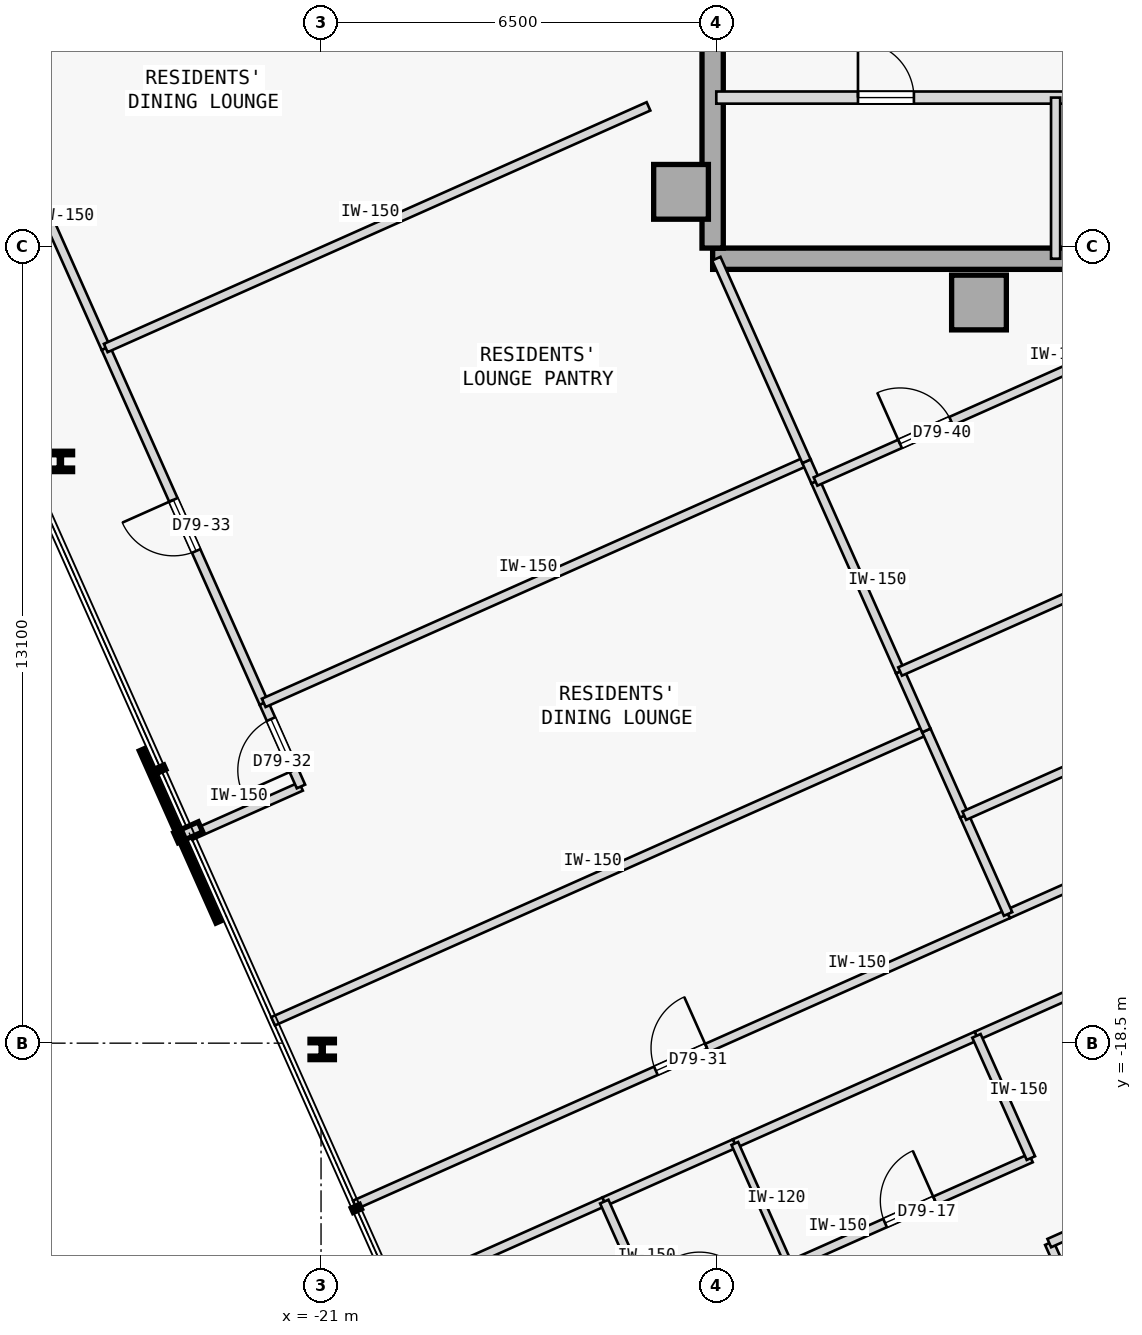
"""IFC4 building model, lengths in metres.
Left out: names, types, materials, properties, quantities, classifications, styles, units other than length and angle.
Written with IfcOpenShell. Run it as: python <this file> out.ifc"""

import sys

from ifc_helpers import new_model, si_unit, direction, frame, frame_2d, origin, origin_2d, place, context, subcontext, project, spatial, rectangle, i_section, extrude, element, fill, save


model = new_model("IFC4")
c1 = context("Model", 3, precision=1e-05, world=origin(), true_north=direction((0.0, 1.0)))
c2 = subcontext(c1, "Body", "Model", "MODEL_VIEW")
j1 = project(units=[si_unit("LENGTHUNIT", "METRE"), si_unit("PLANEANGLEUNIT", "RADIAN")], contexts=[c1])
p1 = place(None, origin())
s1 = spatial("IfcSite", under=j1, at=p1, CompositionType="ELEMENT")
p2 = place(p1, origin())
s2 = spatial("IfcBuilding", under=s1, at=p2, CompositionType="ELEMENT")
p3 = place(p2, frame((0.0, 0.0, 295.3)))
s3 = spatial("IfcBuildingStorey", under=s2, at=p3, CompositionType="ELEMENT", Elevation=295.3)
for number, where, z_axis, x_axis in (
    (1, (-15.08, -4.5, 0.0), (0.0, 0.0, 1.0), (1.0, 0.0, 0.0)),
    (2, (-10.18, -6.32, 0.0), (0.0, 0.0, 1.0), (1.0, 0.0, 0.0)),
):
    element("IfcColumn", number, at=place(p3, frame(where, z_axis=z_axis, x_axis=x_axis)), inside=s3, PredefinedType="COLUMN", context=c2, shape_type="SweptSolid", body=[
        extrude(rectangle(XDim=0.9, YDim=0.9, at=origin_2d()), origin(), (0.0, 0.0, 1.0), 3.35),
    ])
p4 = place(p3, frame((-14.56, -5.6, 0.0), z_axis=(0.0, 0.0, 1.0), x_axis=(1.0, 0.0, 0.0)))
e3 = element("IfcWall", 3, at=p4, inside=s3, PredefinedType="SHEAR", context=c2, shape_type="SweptSolid", body=[
    extrude(rectangle(XDim=10.86, YDim=0.35, at=frame_2d((5.43, 0.0))), origin(), (0.0, 0.0, 1.0), 3.125),
])
p5 = place(p3, frame((-14.56, -5.425, 0.0), z_axis=(0.0, 0.0, 1.0), x_axis=(0.0, 1.0, 0.0)))
e4 = element("IfcWall", 4, at=p5, inside=s3, PredefinedType="SHEAR", context=c2, shape_type="SweptSolid", body=[
    extrude(rectangle(XDim=10.85, YDim=0.35, at=frame_2d((5.425, 0.0))), origin(), (0.0, 0.0, 1.0), 3.125),
])
for number, where, z_axis, x_axis in (
    (5, (-25.286, -8.933, 0.0), (0.0, 0.0, 1.0), (1.0, 0.0, 0.0)),
    (6, (-20.981, -18.603, 0.0), (0.0, 0.0, 1.0), (1.0, 0.0, 0.0)),
):
    element("IfcColumn", number, at=place(p3, frame(where, z_axis=z_axis, x_axis=x_axis)), inside=s3, PredefinedType="COLUMN", context=c2, shape_type="SweptSolid", body=[
        extrude(i_section(OverallWidth=0.401, OverallDepth=0.335, WebThickness=0.036, FlangeThickness=0.058, FilletRadius=0.015, at=origin_2d()), origin(), (0.0, 0.0, 1.0), 3.35),
    ])
p6 = place(p3, frame((-14.5, -2.95, 0.0), z_axis=(0.0, 0.0, 1.0), x_axis=(1.0, 0.0, 0.0)))
e7 = element("IfcWall", 7, at=p6, inside=s3, PredefinedType="STANDARD", context=c2, shape_type="SweptSolid", body=[
    extrude(rectangle(XDim=10.8, YDim=0.2, at=frame_2d((5.4, 0.0))), origin(), (0.0, 0.0, 1.0), 3.125),
])
p7 = place(p6, frame((9.17, 0.0, 0.0)))
e8 = element("IfcOpeningElement", 8, at=p7, cuts=e7, PredefinedType="OPENING", context=c2, shape_type="SweptSolid", body=[
    extrude(rectangle(XDim=1.1, YDim=2.15, at=frame_2d((0.55, 1.075))), frame((0.0, 0.11, 0.0), z_axis=(0.0, -1.0, 0.0), x_axis=(1.0, 0.0, 0.0)), (0.0, 0.0, 1.0), 0.22),
])
p8 = place(p6, frame((2.33, 0.0, 0.0)))
e9 = element("IfcOpeningElement", 9, at=p8, cuts=e7, PredefinedType="OPENING", context=c2, shape_type="SweptSolid", body=[
    extrude(rectangle(XDim=0.92, YDim=2.15, at=frame_2d((0.46, 1.075))), frame((0.0, 0.11, 0.0), z_axis=(0.0, -1.0, 0.0), x_axis=(1.0, 0.0, 0.0)), (0.0, 0.0, 1.0), 0.22),
])
p9 = place(p6, frame((6.65, 0.0, 0.0)))
e10 = element("IfcOpeningElement", 10, at=p9, cuts=e7, PredefinedType="OPENING", context=c2, shape_type="SweptSolid", body=[
    extrude(rectangle(XDim=0.92, YDim=2.15, at=frame_2d((0.46, 1.075))), frame((0.0, 0.11, 0.0), z_axis=(0.0, -1.0, 0.0), x_axis=(1.0, 0.0, 0.0)), (0.0, 0.0, 1.0), 0.22),
])
p10 = place(p3, frame((-8.92, -5.6, 0.0), z_axis=(0.0, 0.0, 1.0), x_axis=(0.0, 1.0, 0.0)))
e11 = element("IfcWall", 11, at=p10, inside=s3, PredefinedType="PARTITIONING", context=c2, shape_type="SweptSolid", body=[
    extrude(rectangle(XDim=2.65, YDim=0.15, at=frame_2d((1.325, 0.0))), origin(), (0.0, 0.0, 1.0), 3.125),
])
p11 = place(p3, frame((-19.786, -22.639, 0.0), z_axis=(0.0, 0.0, 1.0), x_axis=(0.913541633228, 0.406745232743, 0.0)))
e12 = element("IfcWall", 12, at=p11, inside=s3, PredefinedType="PARTITIONING", context=c2, shape_type="SweptSolid", body=[
    extrude(rectangle(XDim=3.77, YDim=0.15, at=frame_2d((1.885, 0.0))), origin(), (0.0, 0.0, 1.0), 3.125),
])
p12 = place(p3, frame((-10.221, -18.38, 0.0), z_axis=(0.0, 0.0, 1.0), x_axis=(0.913542602601, 0.406743055543, 0.0)))
e13 = element("IfcWall", 13, at=p12, inside=s3, PredefinedType="PARTITIONING", context=c2, shape_type="SweptSolid", body=[
    extrude(rectangle(XDim=4.458, YDim=0.15, at=frame_2d((2.229, 0.0))), origin(), (0.0, 0.0, 1.0), 3.125),
])
p13 = place(p12, frame((1.754, 0.0, 0.0)))
e14 = element("IfcOpeningElement", 14, at=p13, cuts=e13, PredefinedType="OPENING", context=c2, shape_type="SweptSolid", body=[
    extrude(rectangle(XDim=0.95, YDim=2.15, at=frame_2d((0.475, 1.075))), frame((0.0, 0.085, 0.0), z_axis=(0.0, -1.0, 0.0), x_axis=(1.0, 0.0, 0.0)), (0.0, 0.0, 1.0), 0.17),
])
p14 = place(p3, frame((-16.342, -21.105, 0.0), z_axis=(0.0, 0.0, 1.0), x_axis=(0.913558622212, 0.406707073682, 0.0)))
e15 = element("IfcWall", 15, at=p14, inside=s3, PredefinedType="PARTITIONING", context=c2, shape_type="SweptSolid", body=[
    extrude(rectangle(XDim=2.35, YDim=0.15, at=frame_2d((1.175, 0.0))), origin(), (0.0, 0.0, 1.0), 3.125),
])
p15 = place(p3, frame((-14.195, -20.149, 0.0), z_axis=(0.0, 0.0, 1.0), x_axis=(0.913545193015, 0.406737237438, 0.0)))
e16 = element("IfcWall", 16, at=p15, inside=s3, PredefinedType="PARTITIONING", context=c2, shape_type="SweptSolid", body=[
    extrude(rectangle(XDim=4.35, YDim=0.15, at=frame_2d((2.175, 0.0))), origin(), (0.0, 0.0, 1.0), 3.125),
])
p16 = place(p3, frame((-20.445, -21.159, 0.0), z_axis=(0.0, 0.0, 1.0), x_axis=(0.913547681516, 0.406731648137, 0.0)))
e17 = element("IfcWall", 17, at=p16, inside=s3, PredefinedType="PARTITIONING", context=c2, shape_type="SweptSolid", body=[
    extrude(rectangle(XDim=11.76, YDim=0.15, at=frame_2d((5.88, 0.0))), origin(), (0.0, 0.0, 1.0), 3.125),
])
p17 = place(p16, frame((5.42, 0.0, 0.0)))
e18 = element("IfcOpeningElement", 18, at=p17, cuts=e17, PredefinedType="OPENING", context=c2, shape_type="SweptSolid", body=[
    extrude(rectangle(XDim=0.92, YDim=2.15, at=frame_2d((0.46, 1.075))), frame((0.0, 0.085, 0.0), z_axis=(0.0, -1.0, 0.0), x_axis=(1.0, 0.0, 0.0)), (0.0, 0.0, 1.0), 0.17),
])
p18 = place(p3, frame((-23.148, -15.088, 0.0), z_axis=(0.0, 0.0, 1.0), x_axis=(0.913553334727, 0.406718950392, 0.0)))
e19 = element("IfcWall", 19, at=p18, inside=s3, PredefinedType="PARTITIONING", context=c2, shape_type="SweptSolid", body=[
    extrude(rectangle(XDim=1.99, YDim=0.15, at=frame_2d((0.995, 0.0))), origin(), (0.0, 0.0, 1.0), 3.125),
])
p19 = place(p3, frame((-21.33, -14.279, 0.0), z_axis=(0.0, 0.0, 1.0), x_axis=(-0.406725442105, 0.913550444554, 0.0)))
e20 = element("IfcWall", 20, at=p19, inside=s3, PredefinedType="PARTITIONING", context=c2, shape_type="SweptSolid", body=[
    extrude(rectangle(XDim=1.505, YDim=0.15, at=frame_2d((0.752, 0.0))), origin(), (0.0, 0.0, 1.0), 3.125),
])
p20 = place(p19, frame((0.292, 0.0, 0.0)))
e21 = element("IfcOpeningElement", 21, at=p20, cuts=e20, PredefinedType="OPENING", context=c2, shape_type="SweptSolid", body=[
    extrude(rectangle(XDim=0.92, YDim=2.15, at=frame_2d((0.46, 1.075))), frame((0.0, 0.085, 0.0), z_axis=(0.0, -1.0, 0.0), x_axis=(1.0, 0.0, 0.0)), (0.0, 0.0, 1.0), 0.17),
])
p21 = place(p3, frame((-21.942, -12.904, 0.0), z_axis=(0.0, 0.0, 1.0), x_axis=(-0.406712833395, 0.913556058023, 0.0)))
e22 = element("IfcWall", 22, at=p21, inside=s3, PredefinedType="PARTITIONING", context=c2, shape_type="SweptSolid", body=[
    extrude(rectangle(XDim=6.388, YDim=0.15, at=frame_2d((3.194, 0.0))), origin(), (0.0, 0.0, 1.0), 3.125),
])
p22 = place(p21, frame((2.734, 0.0, 0.0)))
e23 = element("IfcOpeningElement", 23, at=p22, cuts=e22, PredefinedType="OPENING", context=c2, shape_type="SweptSolid", body=[
    extrude(rectangle(XDim=0.92, YDim=2.15, at=frame_2d((0.46, 1.075))), frame((0.0, 0.085, 0.0), z_axis=(0.0, -1.0, 0.0), x_axis=(1.0, 0.0, 0.0)), (0.0, 0.0, 1.0), 0.17),
])
p23 = place(p3, frame((-24.54, -7.068, 0.0), z_axis=(0.0, 0.0, 1.0), x_axis=(-0.406758457302, 0.913535745011, 0.0)))
e24 = element("IfcWall", 24, at=p23, inside=s3, PredefinedType="PARTITIONING", context=c2, shape_type="SweptSolid", body=[
    extrude(rectangle(XDim=7.489, YDim=0.15, at=frame_2d((3.744, 0.0))), origin(), (0.0, 0.0, 1.0), 3.125),
])
p24 = place(p3, frame((-9.702, -16.375, 0.0), z_axis=(0.0, 0.0, 1.0), x_axis=(0.913552389019, 0.406721074594, 0.0)))
e25 = element("IfcWall", 25, at=p24, inside=s3, PredefinedType="PARTITIONING", context=c2, shape_type="SweptSolid", body=[
    extrude(rectangle(XDim=6.57, YDim=0.15, at=frame_2d((3.285, 0.0))), origin(), (0.0, 0.0, 1.0), 3.125),
])
p25 = place(p24, frame((2.825, 0.0, 0.0)))
e26 = element("IfcOpeningElement", 26, at=p25, cuts=e25, PredefinedType="OPENING", context=c2, shape_type="SweptSolid", body=[
    extrude(rectangle(XDim=0.92, YDim=2.15, at=frame_2d((0.46, 1.075))), frame((0.0, 0.085, 0.0), z_axis=(0.0, -1.0, 0.0), x_axis=(1.0, 0.0, 0.0)), (0.0, 0.0, 1.0), 0.17),
])
p26 = place(p3, frame((-15.448, -23.115, 0.0), z_axis=(0.0, 0.0, 1.0), x_axis=(-0.406725294076, 0.913550510459, 0.0)))
e27 = element("IfcWall", 27, at=p26, inside=s3, PredefinedType="PARTITIONING", context=c2, shape_type="SweptSolid", body=[
    extrude(rectangle(XDim=2.2, YDim=0.15, at=frame_2d((1.1, 0.0))), origin(), (0.0, 0.0, 1.0), 3.125),
])
p27 = place(p3, frame((-13.301, -22.159, 0.0), z_axis=(0.0, 0.0, 1.0), x_axis=(0.913545193015, 0.406737237438, 0.0)))
e28 = element("IfcWall", 28, at=p27, inside=s3, PredefinedType="PARTITIONING", context=c2, shape_type="SweptSolid", body=[
    extrude(rectangle(XDim=4.35, YDim=0.15, at=frame_2d((2.175, 0.0))), origin(), (0.0, 0.0, 1.0), 3.125),
])
p28 = place(p27, frame((1.725, 0.0, 0.0)))
e29 = element("IfcOpeningElement", 29, at=p28, cuts=e28, PredefinedType="OPENING", context=c2, shape_type="SweptSolid", body=[
    extrude(rectangle(XDim=0.9, YDim=2.15, at=frame_2d((0.45, 1.075))), frame((0.0, 0.085, 0.0), z_axis=(0.0, -1.0, 0.0), x_axis=(1.0, 0.0, 0.0)), (0.0, 0.0, 1.0), 0.17),
])
p29 = place(p3, frame((-9.327, -20.39, 0.0), z_axis=(0.0, 0.0, 1.0), x_axis=(-0.406725294076, 0.913550510459, 0.0)))
e30 = element("IfcWall", 30, at=p29, inside=s3, PredefinedType="PARTITIONING", context=c2, shape_type="SweptSolid", body=[
    extrude(rectangle(XDim=2.2, YDim=0.15, at=frame_2d((1.1, 0.0))), origin(), (0.0, 0.0, 1.0), 3.125),
])
p30 = place(p3, frame((-6.61, -27.21, 0.0), z_axis=(0.0, 0.0, 1.0), x_axis=(-0.406699433793, 0.913562023375, 0.0)))
e31 = element("IfcWall", 31, at=p30, inside=s3, PredefinedType="PARTITIONING", context=c2, shape_type="SweptSolid", body=[
    extrude(rectangle(XDim=5.935, YDim=0.15, at=frame_2d((2.968, 0.0))), origin(), (0.0, 0.0, 1.0), 3.125),
])
p31 = place(p30, frame((2.518, 0.0, 0.0)))
e32 = element("IfcOpeningElement", 32, at=p31, cuts=e31, PredefinedType="OPENING", context=c2, shape_type="SweptSolid", body=[
    extrude(rectangle(XDim=0.9, YDim=2.15, at=frame_2d((0.45, 1.075))), frame((0.0, 0.085, 0.0), z_axis=(0.0, -1.0, 0.0), x_axis=(1.0, 0.0, 0.0)), (0.0, 0.0, 1.0), 0.17),
])
p32 = place(p3, frame((-9.024, -21.788, 0.0), z_axis=(0.0, 0.0, 1.0), x_axis=(0.913564558304, 0.406693739576, 0.0)))
e33 = element("IfcWall", 33, at=p32, inside=s3, PredefinedType="PARTITIONING", context=c2, shape_type="SweptSolid", body=[
    extrude(rectangle(XDim=4.65, YDim=0.15, at=frame_2d((2.325, 0.0))), origin(), (0.0, 0.0, 1.0), 3.125),
])
p33 = place(p3, frame((-13.301, -22.159, 0.0), z_axis=(0.0, 0.0, 1.0), x_axis=(-0.406725294076, 0.913550510459, 0.0)))
e34 = element("IfcWall", 34, at=p33, inside=s3, PredefinedType="PARTITIONING", context=c2, shape_type="SweptSolid", body=[
    extrude(rectangle(XDim=2.2, YDim=0.12, at=frame_2d((1.1, 0.0))), origin(), (0.0, 0.0, 1.0), 3.125),
])
p34 = place(p3, frame((-21.789, -18.14, 0.0), z_axis=(0.0, 0.0, 1.0), x_axis=(0.913544247064, 0.406739362069, 0.0)))
e35 = element("IfcWall", 35, at=p34, inside=s3, PredefinedType="PARTITIONING", context=c2, shape_type="SweptSolid", body=[
    extrude(rectangle(XDim=11.76, YDim=0.15, at=frame_2d((5.88, 0.0))), origin(), (0.0, 0.0, 1.0), 3.125),
])
p35 = place(p3, frame((-9.702, -16.375, 0.0), z_axis=(0.0, 0.0, 1.0), x_axis=(-0.406740252054, 0.913543850813, 0.0)))
e36 = element("IfcWall", 36, at=p35, inside=s3, PredefinedType="PARTITIONING", context=c2, shape_type="SweptSolid", body=[
    extrude(rectangle(XDim=1.769, YDim=0.15, at=frame_2d((0.884, 0.0))), origin(), (0.0, 0.0, 1.0), 3.125),
])
p36 = place(p3, frame((-10.421, -14.76, 0.0), z_axis=(0.0, 0.0, 1.0), x_axis=(-0.406817131294, 0.91350961773, 0.0)))
e37 = element("IfcWall", 37, at=p36, inside=s3, PredefinedType="PARTITIONING", context=c2, shape_type="SweptSolid", body=[
    extrude(rectangle(XDim=1.535, YDim=0.15, at=frame_2d((0.768, 0.0))), origin(), (0.0, 0.0, 1.0), 3.125),
])
p37 = place(p3, frame((-21.942, -12.904, 0.0), z_axis=(0.0, 0.0, 1.0), x_axis=(0.913542396088, 0.40674351937, 0.0)))
e38 = element("IfcWall", 38, at=p37, inside=s3, PredefinedType="PARTITIONING", context=c2, shape_type="SweptSolid", body=[
    extrude(rectangle(XDim=9.77, YDim=0.15, at=frame_2d((4.885, 0.0))), origin(), (0.0, 0.0, 1.0), 3.125),
])
p38 = place(p3, frame((-11.046, -13.357, 0.0), z_axis=(0.0, 0.0, 1.0), x_axis=(-0.406629497236, 0.913593154515, 0.0)))
e39 = element("IfcWall", 39, at=p38, inside=s3, PredefinedType="PARTITIONING", context=c2, shape_type="SweptSolid", body=[
    extrude(rectangle(XDim=1.061, YDim=0.15, at=frame_2d((0.53, 0.0))), origin(), (0.0, 0.0, 1.0), 3.125),
])
p39 = place(p3, frame((-11.477, -12.388, 0.0), z_axis=(0.0, 0.0, 1.0), x_axis=(-0.406760980894, 0.913534621359, 0.0)))
e40 = element("IfcWall", 40, at=p39, inside=s3, PredefinedType="PARTITIONING", context=c2, shape_type="SweptSolid", body=[
    extrude(rectangle(XDim=3.42, YDim=0.15, at=frame_2d((1.71, 0.0))), origin(), (0.0, 0.0, 1.0), 3.125),
])
p40 = place(p3, frame((-12.868, -9.264, 0.0), z_axis=(0.0, 0.0, 1.0), x_axis=(-0.406634840409, 0.913590776314, 0.0)))
e41 = element("IfcWall", 41, at=p40, inside=s3, PredefinedType="PARTITIONING", context=c2, shape_type="SweptSolid", body=[
    extrude(rectangle(XDim=0.365, YDim=0.15, at=frame_2d((0.183, 0.0))), origin(), (0.0, 0.0, 1.0), 3.125),
])
p41 = place(p3, frame((-24.54, -7.068, 0.0), z_axis=(0.0, 0.0, 1.0), x_axis=(0.913551681238, 0.406722664364, 0.0)))
e42 = element("IfcWall", 42, at=p41, inside=s3, PredefinedType="PARTITIONING", context=c2, shape_type="SweptSolid", body=[
    extrude(rectangle(XDim=9.77, YDim=0.15, at=frame_2d((4.885, 0.0))), origin(), (0.0, 0.0, 1.0), 3.125),
])
p42 = place(p3, frame((-13.017, -8.93, 0.0), z_axis=(0.0, 0.0, 1.0), x_axis=(-0.406722395322, 0.913551801018, 0.0)))
e43 = element("IfcWall", 43, at=p42, inside=s3, PredefinedType="PARTITIONING", context=c2, shape_type="SweptSolid", body=[
    extrude(rectangle(XDim=3.646, YDim=0.15, at=frame_2d((1.823, 0.0))), origin(), (0.0, 0.0, 1.0), 3.125),
])
p43 = place(p3, frame((-10.421, -14.76, 0.0), z_axis=(0.0, 0.0, 1.0), x_axis=(0.913533574053, 0.406763333006, 0.0)))
e44 = element("IfcWall", 44, at=p43, inside=s3, PredefinedType="PARTITIONING", context=c2, shape_type="SweptSolid", body=[
    extrude(rectangle(XDim=7.358, YDim=0.15, at=frame_2d((3.679, 0.0))), origin(), (0.0, 0.0, 1.0), 3.125),
])
p44 = place(p3, frame((-11.477, -12.388, 0.0), z_axis=(0.0, 0.0, 1.0), x_axis=(0.913542897736, 0.406742392673, 0.0)))
e45 = element("IfcWall", 45, at=p44, inside=s3, PredefinedType="PARTITIONING", context=c2, shape_type="SweptSolid", body=[
    extrude(rectangle(XDim=8.513, YDim=0.15, at=frame_2d((4.257, 0.0))), origin(), (0.0, 0.0, 1.0), 3.125),
])
p45 = place(p3, frame((-12.868, -9.264, 0.0), z_axis=(0.0, 0.0, 1.0), x_axis=(0.913545332854, 0.406736923356, 0.0)))
e46 = element("IfcWall", 46, at=p45, inside=s3, PredefinedType="PARTITIONING", context=c2, shape_type="SweptSolid", body=[
    extrude(rectangle(XDim=9.007, YDim=0.15, at=frame_2d((4.504, 0.0))), origin(), (0.0, 0.0, 1.0), 3.125),
])
p46 = place(p45, frame((1.521, 0.0, 0.0)))
e47 = element("IfcOpeningElement", 47, at=p46, cuts=e46, PredefinedType="OPENING", context=c2, shape_type="SweptSolid", body=[
    extrude(rectangle(XDim=0.92, YDim=2.15, at=frame_2d((0.46, 1.075))), frame((0.0, 0.085, 0.0), z_axis=(0.0, -1.0, 0.0), x_axis=(1.0, 0.0, 0.0)), (0.0, 0.0, 1.0), 0.17),
])
p47 = place(p8, origin())
e48 = element("IfcDoor", 48, at=p47, inside=s3, OperationType="SINGLE_SWING_LEFT", PredefinedType="DOOR", context=c2, shape_type="SweptSolid", body=[
    extrude(rectangle(XDim=0.92, YDim=2.15, at=frame_2d((0.46, 1.075))), frame((0.0, 0.025, 0.0), z_axis=(0.0, -1.0, 0.0), x_axis=(1.0, 0.0, 0.0)), (0.0, 0.0, 1.0), 0.05),
])
fill(e9, e48)
p48 = place(p28, origin())
e49 = element("IfcDoor", 49, at=p48, inside=s3, OperationType="SINGLE_SWING_RIGHT", PredefinedType="DOOR", context=c2, shape_type="SweptSolid", body=[
    extrude(rectangle(XDim=0.9, YDim=2.15, at=frame_2d((0.45, 1.075))), frame((0.0, 0.025, 0.0), z_axis=(0.0, -1.0, 0.0), x_axis=(1.0, 0.0, 0.0)), (0.0, 0.0, 1.0), 0.05),
])
fill(e29, e49)
p49 = place(p17, origin())
e50 = element("IfcDoor", 50, at=p49, inside=s3, OperationType="SINGLE_SWING_RIGHT", PredefinedType="DOOR", context=c2, shape_type="SweptSolid", body=[
    extrude(rectangle(XDim=0.92, YDim=2.15, at=frame_2d((0.46, 1.075))), frame((0.0, 0.025, 0.0), z_axis=(0.0, -1.0, 0.0), x_axis=(1.0, 0.0, 0.0)), (0.0, 0.0, 1.0), 0.05),
])
fill(e18, e50)
p50 = place(p20, origin())
e51 = element("IfcDoor", 51, at=p50, inside=s3, OperationType="SINGLE_SWING_LEFT", PredefinedType="DOOR", context=c2, shape_type="SweptSolid", body=[
    extrude(rectangle(XDim=0.92, YDim=2.15, at=frame_2d((0.46, 1.075))), frame((0.0, 0.025, 0.0), z_axis=(0.0, -1.0, 0.0), x_axis=(1.0, 0.0, 0.0)), (0.0, 0.0, 1.0), 0.05),
])
fill(e21, e51)
p51 = place(p22, origin())
e52 = element("IfcDoor", 52, at=p51, inside=s3, OperationType="SINGLE_SWING_RIGHT", PredefinedType="DOOR", context=c2, shape_type="SweptSolid", body=[
    extrude(rectangle(XDim=0.92, YDim=2.15, at=frame_2d((0.46, 1.075))), frame((0.0, 0.025, 0.0), z_axis=(0.0, -1.0, 0.0), x_axis=(1.0, 0.0, 0.0)), (0.0, 0.0, 1.0), 0.05),
])
fill(e23, e52)
p52 = place(p46, origin())
e53 = element("IfcDoor", 53, at=p52, inside=s3, OperationType="SINGLE_SWING_LEFT", PredefinedType="DOOR", context=c2, shape_type="SweptSolid", body=[
    extrude(rectangle(XDim=0.92, YDim=2.15, at=frame_2d((0.46, 1.075))), frame((0.0, 0.025, 0.0), z_axis=(0.0, -1.0, 0.0), x_axis=(1.0, 0.0, 0.0)), (0.0, 0.0, 1.0), 0.05),
])
fill(e47, e53)
save(model, sys.argv[1])
